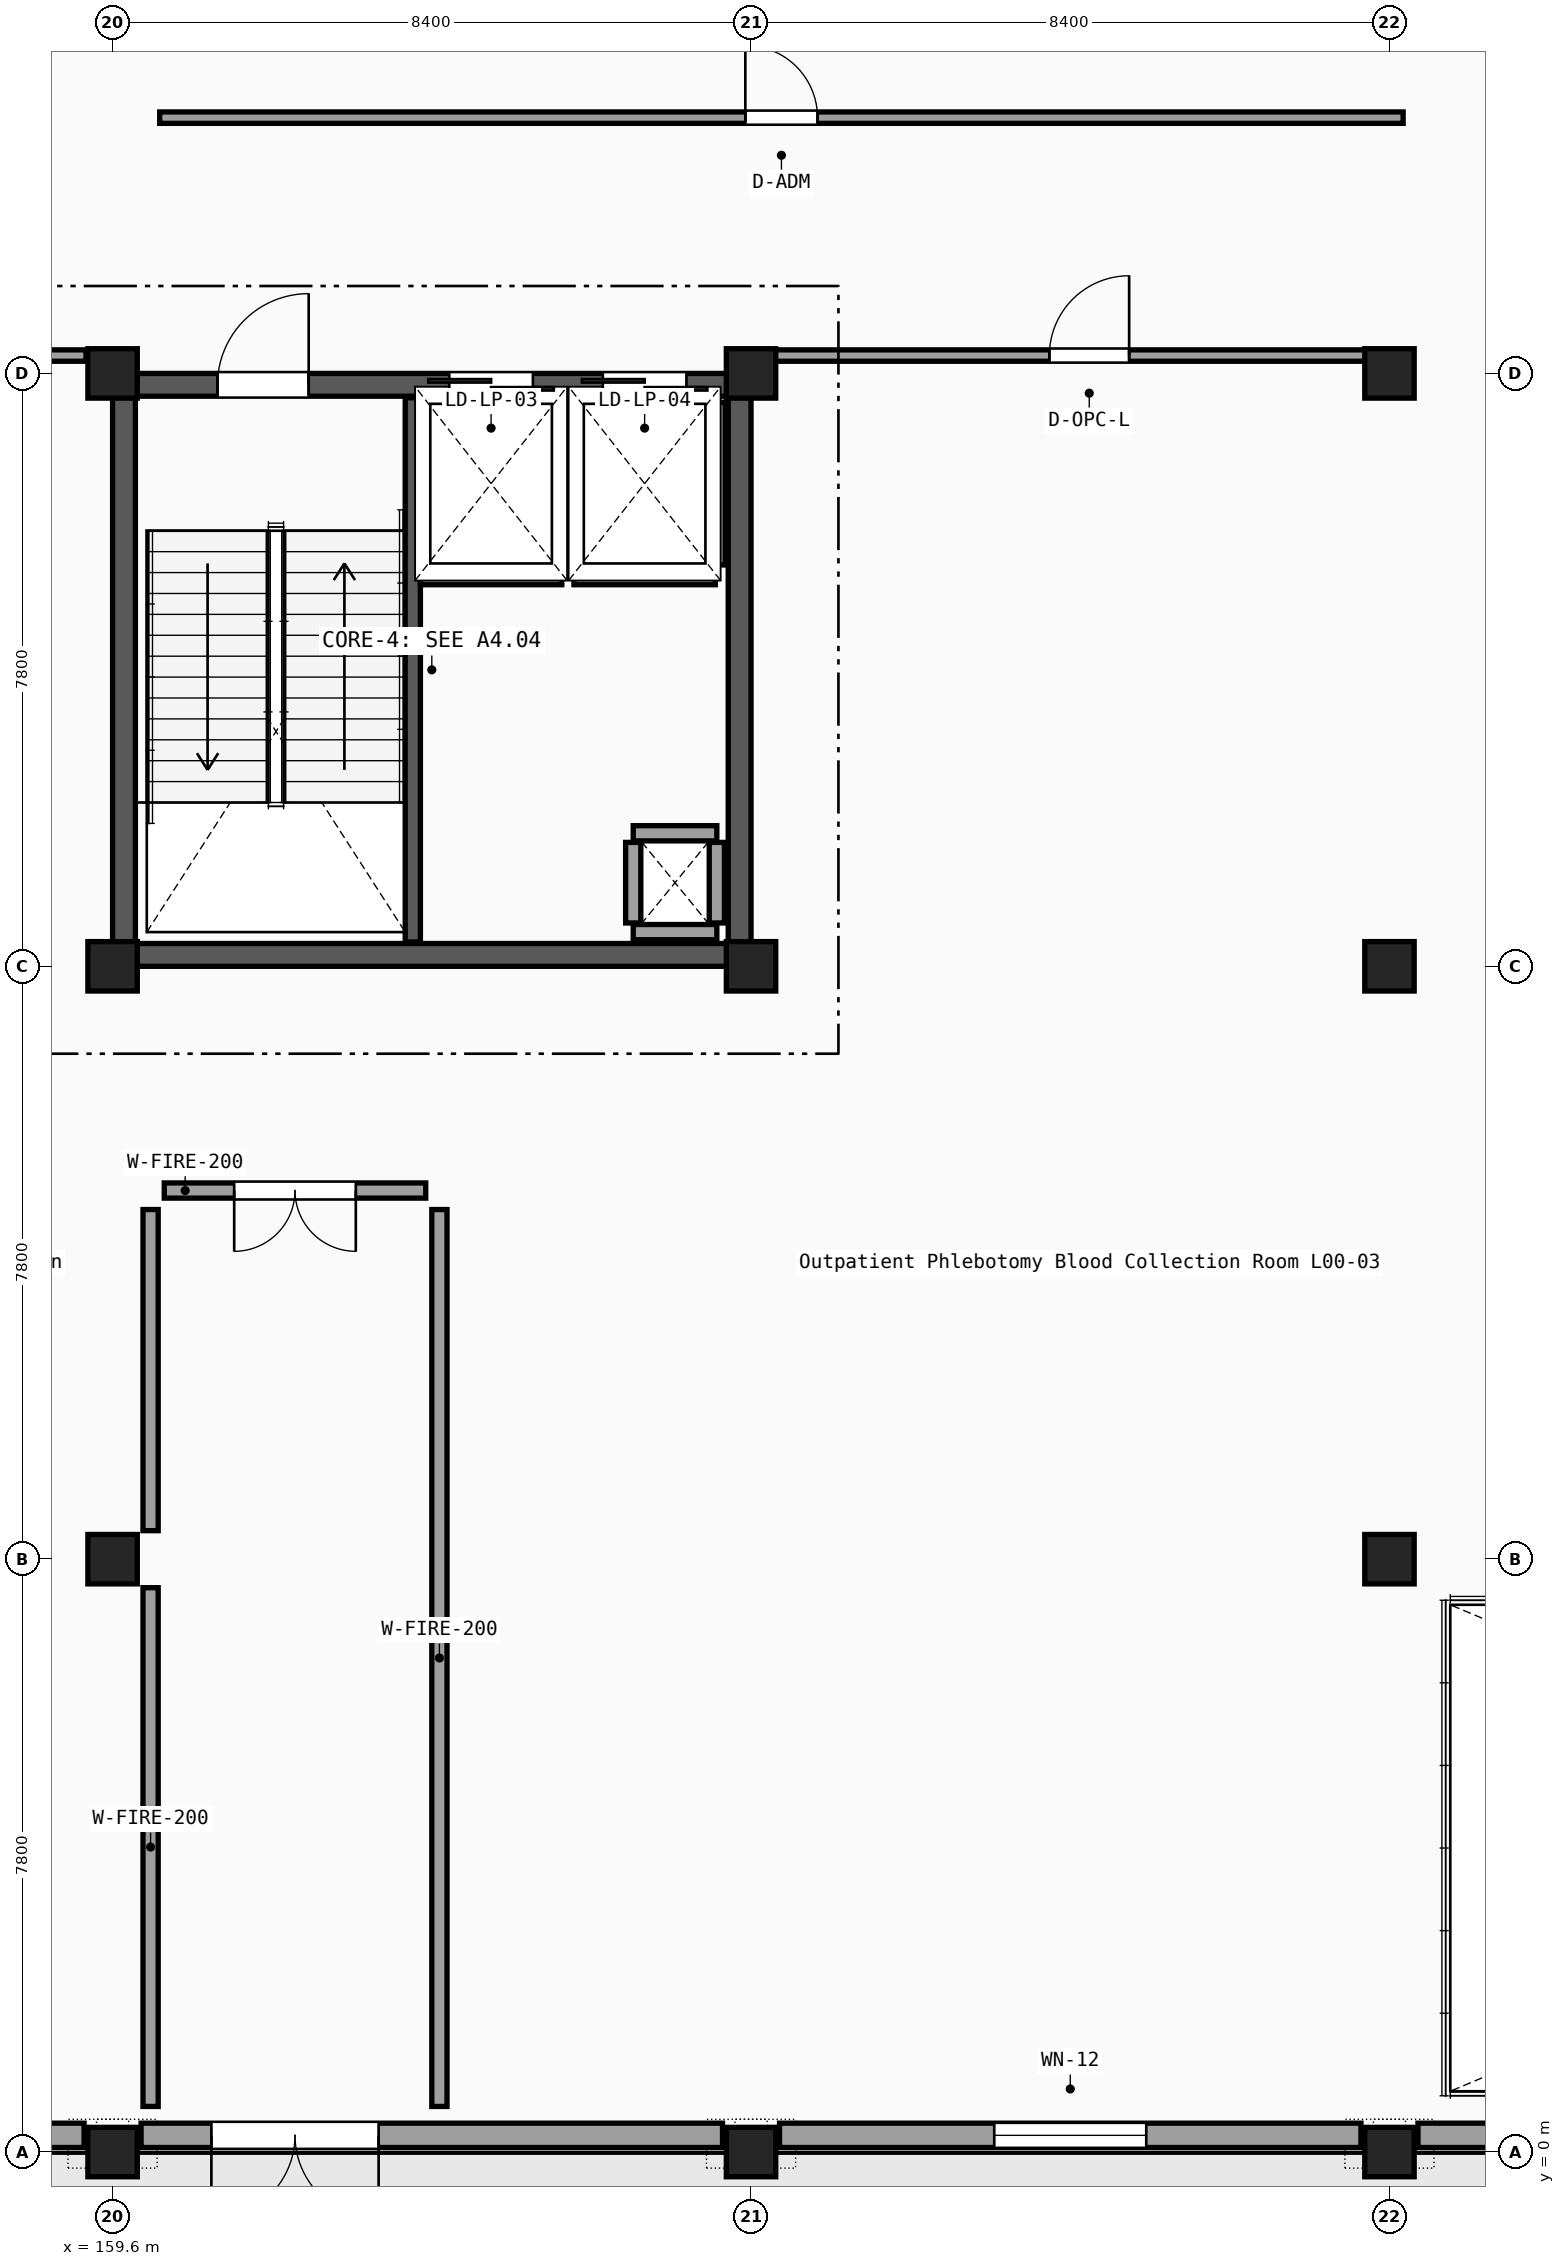
"""IFC4 building model, lengths in metres.
Left out: names, types, materials, properties, quantities, classifications, styles, units other than length and angle.
Written with IfcOpenShell. Run it as: python <this file> out.ifc"""

import sys

from ifc_helpers import new_model, si_unit, direction, frame, frame_2d, origin, origin_2d, place, context, subcontext, project, spatial, rectangle, extrude, element, fill, save


model = new_model("IFC4")
c1 = context("Model", 3, precision=1e-05, world=origin(), true_north=direction((0.0, 1.0)))
c2 = subcontext(c1, "Body", "Model", "MODEL_VIEW")
j1 = project(units=[si_unit("LENGTHUNIT", "METRE"), si_unit("PLANEANGLEUNIT", "RADIAN")], contexts=[c1])
p1 = place(None, origin())
s1 = spatial("IfcSite", under=j1, at=p1, CompositionType="ELEMENT")
p2 = place(p1, origin())
s2 = spatial("IfcBuilding", under=s1, at=p2, CompositionType="ELEMENT")
p3 = place(p2, origin())
s3 = spatial("IfcBuildingStorey", under=s2, at=p3, CompositionType="ELEMENT", Elevation=0.0)
for number, where, z_axis, x_axis in (
    (1, (159.6, 0.0, 0.0), (0.0, 0.0, 1.0), (1.0, 0.0, 0.0)),
    (2, (159.6, 7.8, 0.0), (0.0, 0.0, 1.0), (1.0, 0.0, 0.0)),
    (3, (159.6, 15.6, 0.0), (0.0, 0.0, 1.0), (1.0, 0.0, 0.0)),
    (4, (159.6, 23.4, 0.0), (0.0, 0.0, 1.0), (1.0, 0.0, 0.0)),
    (5, (168.0, 0.0, 0.0), (0.0, 0.0, 1.0), (1.0, 0.0, 0.0)),
    (6, (168.0, 15.6, 0.0), (0.0, 0.0, 1.0), (1.0, 0.0, 0.0)),
    (7, (168.0, 23.4, 0.0), (0.0, 0.0, 1.0), (1.0, 0.0, 0.0)),
    (8, (176.4, 0.0, 0.0), (0.0, 0.0, 1.0), (1.0, 0.0, 0.0)),
    (9, (176.4, 7.8, 0.0), (0.0, 0.0, 1.0), (1.0, 0.0, 0.0)),
    (10, (176.4, 15.6, 0.0), (0.0, 0.0, 1.0), (1.0, 0.0, 0.0)),
    (11, (176.4, 23.4, 0.0), (0.0, 0.0, 1.0), (1.0, 0.0, 0.0)),
):
    element("IfcColumn", number, at=place(p3, frame(where, z_axis=z_axis, x_axis=x_axis)), inside=s3, PredefinedType="COLUMN", context=c2, shape_type="SweptSolid", body=[
        extrude(rectangle(XDim=0.65, YDim=0.65, at=origin_2d()), origin(), (0.0, 0.0, 1.0), 5.1),
    ])
p4 = place(p3, frame((151.575, 0.22, 0.0), z_axis=(0.0, 0.0, 1.0), x_axis=(1.0, 0.0, 0.0)))
e12 = element("IfcWall", 12, at=p4, inside=s3, PredefinedType="SOLIDWALL", context=c2, shape_type="SweptSolid", body=[
    extrude(rectangle(XDim=7.65, YDim=0.32, at=frame_2d((3.825, 0.0))), origin(), (0.0, 0.0, 1.0), 4.46),
])
p5 = place(p4, frame((0.475, 0.0, 0.0)))
e13 = element("IfcOpeningElement", 13, at=p5, cuts=e12, PredefinedType="OPENING", context=c2, shape_type="SweptSolid", body=[
    extrude(rectangle(XDim=2.2, YDim=2.3, at=frame_2d((1.1, 1.15))), frame((0.0, 0.17, 0.0), z_axis=(0.0, -1.0, 0.0), x_axis=(1.0, 0.0, 0.0)), (0.0, 0.0, 1.0), 0.34),
])
p6 = place(p3, frame((159.975, 0.22, 0.0), z_axis=(0.0, 0.0, 1.0), x_axis=(1.0, 0.0, 0.0)))
e14 = element("IfcWall", 14, at=p6, inside=s3, PredefinedType="SOLIDWALL", context=c2, shape_type="SweptSolid", body=[
    extrude(rectangle(XDim=7.65, YDim=0.32, at=frame_2d((3.825, 0.0))), origin(), (0.0, 0.0, 1.0), 4.46),
])
p7 = place(p6, frame((0.925, 0.0, 0.0)))
e15 = element("IfcOpeningElement", 15, at=p7, cuts=e14, PredefinedType="OPENING", context=c2, shape_type="SweptSolid", body=[
    extrude(rectangle(XDim=2.2, YDim=2.3, at=frame_2d((1.1, 1.15))), frame((0.0, 0.17, 0.0), z_axis=(0.0, -1.0, 0.0), x_axis=(1.0, 0.0, 0.0)), (0.0, 0.0, 1.0), 0.34),
])
p8 = place(p3, frame((168.375, 0.22, 0.0), z_axis=(0.0, 0.0, 1.0), x_axis=(1.0, 0.0, 0.0)))
e16 = element("IfcWall", 16, at=p8, inside=s3, PredefinedType="SOLIDWALL", context=c2, shape_type="SweptSolid", body=[
    extrude(rectangle(XDim=7.65, YDim=0.32, at=frame_2d((3.825, 0.0))), origin(), (0.0, 0.0, 1.0), 4.46),
])
p9 = place(p8, frame((2.825, 0.0, 0.85)))
e17 = element("IfcOpeningElement", 17, at=p9, cuts=e16, PredefinedType="OPENING", context=c2, shape_type="SweptSolid", body=[
    extrude(rectangle(XDim=2.0, YDim=1.65, at=frame_2d((1.0, 0.825))), frame((0.0, 0.17, 0.0), z_axis=(0.0, -1.0, 0.0), x_axis=(1.0, 0.0, 0.0)), (0.0, 0.0, 1.0), 0.34),
])
p10 = place(p3, frame((176.775, 0.22, 0.0), z_axis=(0.0, 0.0, 1.0), x_axis=(1.0, 0.0, 0.0)))
e18 = element("IfcWall", 18, at=p10, inside=s3, PredefinedType="SOLIDWALL", context=c2, shape_type="SweptSolid", body=[
    extrude(rectangle(XDim=7.65, YDim=0.32, at=frame_2d((3.825, 0.0))), origin(), (0.0, 0.0, 1.0), 4.46),
])
p11 = place(p10, frame((3.0, 0.0, 0.75)))
e19 = element("IfcOpeningElement", 19, at=p11, cuts=e18, PredefinedType="OPENING", context=c2, shape_type="SweptSolid", body=[
    extrude(rectangle(XDim=1.65, YDim=1.75, at=frame_2d((0.825, 0.875))), frame((0.0, 0.17, 0.0), z_axis=(0.0, -1.0, 0.0), x_axis=(1.0, 0.0, 0.0)), (0.0, 0.0, 1.0), 0.34),
])
p12 = place(p3, frame((159.6, 15.75, 0.0), z_axis=(0.0, 0.0, 1.0), x_axis=(1.0, 0.0, 0.0)))
e20 = element("IfcWall", 20, at=p12, inside=s3, PredefinedType="SHEAR", context=c2, shape_type="SweptSolid", body=[
    extrude(rectangle(XDim=8.4, YDim=0.3, at=frame_2d((4.2, 0.0))), origin(), (0.0, 0.0, 1.0), 4.87),
])
p13 = place(p3, frame((159.6, 23.25, 0.0), z_axis=(0.0, 0.0, 1.0), x_axis=(1.0, 0.0, 0.0)))
e21 = element("IfcWall", 21, at=p13, inside=s3, PredefinedType="SHEAR", context=c2, shape_type="SweptSolid", body=[
    extrude(rectangle(XDim=8.4, YDim=0.3, at=frame_2d((4.2, 0.0))), origin(), (0.0, 0.0, 1.0), 4.87),
])
p14 = place(p13, frame((1.38, 0.0, 0.0)))
e22 = element("IfcOpeningElement", 22, at=p14, cuts=e21, PredefinedType="OPENING", context=c2, shape_type="SweptSolid", body=[
    extrude(rectangle(XDim=1.2, YDim=2.15, at=frame_2d((0.6, 1.075))), frame((0.0, 0.16, 0.0), z_axis=(0.0, -1.0, 0.0), x_axis=(1.0, 0.0, 0.0)), (0.0, 0.0, 1.0), 0.32),
])
p15 = place(p13, frame((4.43, 0.0, 0.0)))
e23 = element("IfcOpeningElement", 23, at=p15, cuts=e21, PredefinedType="OPENING", context=c2, shape_type="SweptSolid", body=[
    extrude(rectangle(XDim=1.1, YDim=2.15, at=frame_2d((0.55, 1.075))), frame((0.0, 0.16, 0.0), z_axis=(0.0, -1.0, 0.0), x_axis=(1.0, 0.0, 0.0)), (0.0, 0.0, 1.0), 0.32),
])
p16 = place(p13, frame((6.45, 0.0, 0.0)))
e24 = element("IfcOpeningElement", 24, at=p16, cuts=e21, PredefinedType="OPENING", context=c2, shape_type="SweptSolid", body=[
    extrude(rectangle(XDim=1.1, YDim=2.15, at=frame_2d((0.55, 1.075))), frame((0.0, 0.16, 0.0), z_axis=(0.0, -1.0, 0.0), x_axis=(1.0, 0.0, 0.0)), (0.0, 0.0, 1.0), 0.32),
])
for number, where, z_axis, x_axis in (
    (25, (159.75, 15.9, 0.0), (0.0, 0.0, 1.0), (0.0, 1.0, 0.0)),
    (26, (167.85, 15.9, 0.0), (0.0, 0.0, 1.0), (0.0, 1.0, 0.0)),
):
    element("IfcWall", number, at=place(p3, frame(where, z_axis=z_axis, x_axis=x_axis)), inside=s3, PredefinedType="SHEAR", context=c2, shape_type="SweptSolid", body=[
        extrude(rectangle(XDim=7.2, YDim=0.3, at=frame_2d((3.6, 0.0))), origin(), (0.0, 0.0, 1.0), 4.87),
    ])
p17 = place(p3, frame((163.55, 15.92, 0.0), z_axis=(0.0, 0.0, 1.0), x_axis=(0.0, 1.0, 0.0)))
e27 = element("IfcWall", 27, at=p17, inside=s3, PredefinedType="SHEAR", context=c2, shape_type="SweptSolid", body=[
    extrude(rectangle(XDim=7.16, YDim=0.2, at=frame_2d((3.58, 0.0))), origin(), (0.0, 0.0, 1.0), 4.87),
])
for number, where, z_axis, x_axis in (
    (28, (166.45, 16.05, 0.0), (0.0, 0.0, 1.0), (1.0, 0.0, 0.0)),
    (29, (166.45, 17.35, 0.0), (0.0, 0.0, 1.0), (1.0, 0.0, 0.0)),
):
    element("IfcWall", number, at=place(p3, frame(where, z_axis=z_axis, x_axis=x_axis)), inside=s3, PredefinedType="PARTITIONING", context=c2, shape_type="SweptSolid", body=[
        extrude(rectangle(XDim=1.1, YDim=0.2, at=frame_2d((0.55, 0.0))), origin(), (0.0, 0.0, 1.0), 4.35),
    ])
for number, where, z_axis, x_axis in (
    (30, (166.45, 16.17, 0.0), (0.0, 0.0, 1.0), (0.0, 1.0, 0.0)),
    (31, (167.55, 16.17, 0.0), (0.0, 0.0, 1.0), (0.0, 1.0, 0.0)),
):
    element("IfcWall", number, at=place(p3, frame(where, z_axis=z_axis, x_axis=x_axis)), inside=s3, PredefinedType="PARTITIONING", context=c2, shape_type="SweptSolid", body=[
        extrude(rectangle(XDim=1.06, YDim=0.2, at=frame_2d((0.53, 0.0))), origin(), (0.0, 0.0, 1.0), 4.35),
    ])
p18 = place(p3, frame((165.54, 20.88, 0.0), z_axis=(0.0, 0.0, 1.0), x_axis=(0.0, 1.0, 0.0)))
e32 = element("IfcWall", 32, at=p18, inside=s3, PredefinedType="PARTITIONING", context=c2, shape_type="SweptSolid", body=[
    extrude(rectangle(XDim=2.14, YDim=0.2, at=frame_2d((1.07, 0.0))), origin(), (0.0, 0.0, 1.0), 4.35),
])
p19 = place(p3, frame((163.65, 20.72, 0.0), z_axis=(0.0, 0.0, 1.0), x_axis=(1.0, 0.0, 0.0)))
e33 = element("IfcWall", 33, at=p19, inside=s3, PredefinedType="PARTITIONING", context=c2, shape_type="SweptSolid", body=[
    extrude(rectangle(XDim=1.86, YDim=0.2, at=frame_2d((0.93, 0.0))), origin(), (0.0, 0.0, 1.0), 4.35),
])
p20 = place(p3, frame((167.56, 20.88, 0.0), z_axis=(0.0, 0.0, 1.0), x_axis=(0.0, 1.0, 0.0)))
e34 = element("IfcWall", 34, at=p20, inside=s3, PredefinedType="PARTITIONING", context=c2, shape_type="SweptSolid", body=[
    extrude(rectangle(XDim=2.14, YDim=0.2, at=frame_2d((1.07, 0.0))), origin(), (0.0, 0.0, 1.0), 4.35),
])
p21 = place(p3, frame((165.67, 20.72, 0.0), z_axis=(0.0, 0.0, 1.0), x_axis=(1.0, 0.0, 0.0)))
e35 = element("IfcWall", 35, at=p21, inside=s3, PredefinedType="PARTITIONING", context=c2, shape_type="SweptSolid", body=[
    extrude(rectangle(XDim=1.86, YDim=0.2, at=frame_2d((0.93, 0.0))), origin(), (0.0, 0.0, 1.0), 4.35),
])
p22 = place(p3, frame((160.1, 0.6, 0.0), z_axis=(0.0, 0.0, 1.0), x_axis=(0.0, 1.0, 0.0)))
e36 = element("IfcWall", 36, at=p22, inside=s3, PredefinedType="PARTITIONING", context=c2, shape_type="SweptSolid", body=[
    extrude(rectangle(XDim=6.825, YDim=0.2, at=frame_2d((3.413, 0.0))), origin(), (0.0, 0.0, 1.0), 4.82),
])
p23 = place(p3, frame((160.1, 8.175, 0.0), z_axis=(0.0, 0.0, 1.0), x_axis=(0.0, 1.0, 0.0)))
e37 = element("IfcWall", 37, at=p23, inside=s3, PredefinedType="PARTITIONING", context=c2, shape_type="SweptSolid", body=[
    extrude(rectangle(XDim=4.225, YDim=0.2, at=frame_2d((2.112, 0.0))), origin(), (0.0, 0.0, 1.0), 4.82),
])
p24 = place(p3, frame((163.9, 0.6, 0.0), z_axis=(0.0, 0.0, 1.0), x_axis=(0.0, 1.0, 0.0)))
e38 = element("IfcWall", 38, at=p24, inside=s3, PredefinedType="PARTITIONING", context=c2, shape_type="SweptSolid", body=[
    extrude(rectangle(XDim=11.8, YDim=0.2, at=frame_2d((5.9, 0.0))), origin(), (0.0, 0.0, 1.0), 4.35),
])
p25 = place(p3, frame((160.28, 12.65, 0.0), z_axis=(0.0, 0.0, 1.0), x_axis=(1.0, 0.0, 0.0)))
e39 = element("IfcWall", 39, at=p25, inside=s3, PredefinedType="PARTITIONING", context=c2, shape_type="SweptSolid", body=[
    extrude(rectangle(XDim=3.44, YDim=0.2, at=frame_2d((1.72, 0.0))), origin(), (0.0, 0.0, 1.0), 4.82),
])
p26 = place(p25, frame((0.92, 0.0, 0.0)))
e40 = element("IfcOpeningElement", 40, at=p26, cuts=e39, PredefinedType="OPENING", context=c2, shape_type="SweptSolid", body=[
    extrude(rectangle(XDim=1.6, YDim=2.2, at=frame_2d((0.8, 1.1))), frame((0.0, 0.11, 0.0), z_axis=(0.0, -1.0, 0.0), x_axis=(1.0, 0.0, 0.0)), (0.0, 0.0, 1.0), 0.22),
])
p27 = place(p3, frame((155.1, 23.635, 0.0), z_axis=(0.0, 0.0, 1.0), x_axis=(1.0, 0.0, 0.0)))
e41 = element("IfcWall", 41, at=p27, inside=s3, PredefinedType="PARTITIONING", context=c2, shape_type="SweptSolid", body=[
    extrude(rectangle(XDim=4.15, YDim=0.15, at=frame_2d((2.075, 0.0))), origin(), (0.0, 0.0, 1.0), 4.35),
])
p28 = place(p27, frame((1.55, 0.0, 0.0)))
e42 = element("IfcOpeningElement", 42, at=p28, cuts=e41, PredefinedType="OPENING", context=c2, shape_type="SweptSolid", body=[
    extrude(rectangle(XDim=1.05, YDim=2.15, at=frame_2d((0.525, 1.075))), frame((0.0, 0.085, 0.0), z_axis=(0.0, -1.0, 0.0), x_axis=(1.0, 0.0, 0.0)), (0.0, 0.0, 1.0), 0.17),
])
p29 = place(p3, frame((168.32, 23.635, 0.0), z_axis=(0.0, 0.0, 1.0), x_axis=(1.0, 0.0, 0.0)))
e43 = element("IfcWall", 43, at=p29, inside=s3, PredefinedType="PARTITIONING", context=c2, shape_type="SweptSolid", body=[
    extrude(rectangle(XDim=8.26, YDim=0.15, at=frame_2d((4.13, 0.0))), origin(), (0.0, 0.0, 1.0), 4.35),
])
p30 = place(p29, frame((3.605, 0.0, 0.0)))
e44 = element("IfcOpeningElement", 44, at=p30, cuts=e43, PredefinedType="OPENING", context=c2, shape_type="SweptSolid", body=[
    extrude(rectangle(XDim=1.05, YDim=2.15, at=frame_2d((0.525, 1.075))), frame((0.0, 0.085, 0.0), z_axis=(0.0, -1.0, 0.0), x_axis=(1.0, 0.0, 0.0)), (0.0, 0.0, 1.0), 0.17),
])
p31 = place(p3, frame((160.22, 26.765, 0.0), z_axis=(0.0, 0.0, 1.0), x_axis=(1.0, 0.0, 0.0)))
e45 = element("IfcWall", 45, at=p31, inside=s3, PredefinedType="PARTITIONING", context=c2, shape_type="SweptSolid", body=[
    extrude(rectangle(XDim=16.36, YDim=0.15, at=frame_2d((8.18, 0.0))), origin(), (0.0, 0.0, 1.0), 4.45),
])
p32 = place(p31, frame((7.705, 0.0, 0.0)))
e46 = element("IfcOpeningElement", 46, at=p32, cuts=e45, PredefinedType="OPENING", context=c2, shape_type="SweptSolid", body=[
    extrude(rectangle(XDim=0.95, YDim=2.1, at=frame_2d((0.475, 1.05))), frame((0.0, 0.085, 0.0), z_axis=(0.0, -1.0, 0.0), x_axis=(1.0, 0.0, 0.0)), (0.0, 0.0, 1.0), 0.17),
])
p33 = place(p7, frame((2.2, 0.0, 0.0), z_axis=(0.0, 0.0, 1.0), x_axis=(-1.0, 0.0, 0.0)))
e47 = element("IfcDoor", 47, at=p33, inside=s3, OperationType="DOUBLE_DOOR_SINGLE_SWING", PredefinedType="DOOR", context=c2, shape_type="SweptSolid", body=[
    extrude(rectangle(XDim=2.2, YDim=2.3, at=frame_2d((1.1, 1.15))), frame((0.0, 0.025, 0.0), z_axis=(0.0, -1.0, 0.0), x_axis=(1.0, 0.0, 0.0)), (0.0, 0.0, 1.0), 0.05),
])
fill(e15, e47)
p34 = place(p9, origin())
e48 = element("IfcWindow", 48, at=p34, inside=s3, PartitioningType="SINGLE_PANEL", PredefinedType="WINDOW", context=c2, shape_type="SweptSolid", body=[
    extrude(rectangle(XDim=2.0, YDim=1.65, at=frame_2d((1.0, 0.825))), frame((0.0, 0.03, 0.0), z_axis=(0.0, -1.0, 0.0), x_axis=(1.0, 0.0, 0.0)), (0.0, 0.0, 1.0), 0.06),
])
fill(e17, e48)
p35 = place(p14, origin())
e49 = element("IfcDoor", 49, at=p35, inside=s3, OperationType="SINGLE_SWING_RIGHT", PredefinedType="DOOR", context=c2, shape_type="SweptSolid", body=[
    extrude(rectangle(XDim=1.2, YDim=2.15, at=frame_2d((0.6, 1.075))), frame((0.0, 0.025, 0.0), z_axis=(0.0, -1.0, 0.0), x_axis=(1.0, 0.0, 0.0)), (0.0, 0.0, 1.0), 0.05),
])
fill(e22, e49)
p36 = place(p15, origin())
e50 = element("IfcDoor", 50, at=p36, inside=s3, OperationType="DOUBLE_DOOR_SLIDING", PredefinedType="DOOR", context=c2, shape_type="SweptSolid", body=[
    extrude(rectangle(XDim=1.1, YDim=2.15, at=frame_2d((0.55, 1.075))), frame((0.0, 0.025, 0.0), z_axis=(0.0, -1.0, 0.0), x_axis=(1.0, 0.0, 0.0)), (0.0, 0.0, 1.0), 0.05),
])
fill(e23, e50)
p37 = place(p16, origin())
e51 = element("IfcDoor", 51, at=p37, inside=s3, OperationType="DOUBLE_DOOR_SLIDING", PredefinedType="DOOR", context=c2, shape_type="SweptSolid", body=[
    extrude(rectangle(XDim=1.1, YDim=2.15, at=frame_2d((0.55, 1.075))), frame((0.0, 0.025, 0.0), z_axis=(0.0, -1.0, 0.0), x_axis=(1.0, 0.0, 0.0)), (0.0, 0.0, 1.0), 0.05),
])
fill(e24, e51)
p38 = place(p26, frame((1.6, 0.0, 0.0), z_axis=(0.0, 0.0, 1.0), x_axis=(-1.0, 0.0, 0.0)))
e52 = element("IfcDoor", 52, at=p38, inside=s3, OperationType="DOUBLE_DOOR_SINGLE_SWING", PredefinedType="DOOR", context=c2, shape_type="SweptSolid", body=[
    extrude(rectangle(XDim=1.6, YDim=2.2, at=frame_2d((0.8, 1.1))), frame((0.0, 0.025, 0.0), z_axis=(0.0, -1.0, 0.0), x_axis=(1.0, 0.0, 0.0)), (0.0, 0.0, 1.0), 0.05),
])
fill(e40, e52)
p39 = place(p30, origin())
e53 = element("IfcDoor", 53, at=p39, inside=s3, OperationType="SINGLE_SWING_RIGHT", PredefinedType="DOOR", context=c2, shape_type="SweptSolid", body=[
    extrude(rectangle(XDim=1.05, YDim=2.15, at=frame_2d((0.525, 1.075))), frame((0.0, 0.025, 0.0), z_axis=(0.0, -1.0, 0.0), x_axis=(1.0, 0.0, 0.0)), (0.0, 0.0, 1.0), 0.05),
])
fill(e44, e53)
p40 = place(p32, origin())
e54 = element("IfcDoor", 54, at=p40, inside=s3, OperationType="SINGLE_SWING_LEFT", PredefinedType="DOOR", context=c2, shape_type="SweptSolid", body=[
    extrude(rectangle(XDim=0.95, YDim=2.1, at=frame_2d((0.475, 1.05))), frame((0.0, 0.025, 0.0), z_axis=(0.0, -1.0, 0.0), x_axis=(1.0, 0.0, 0.0)), (0.0, 0.0, 1.0), 0.05),
])
fill(e46, e54)
save(model, sys.argv[1])
